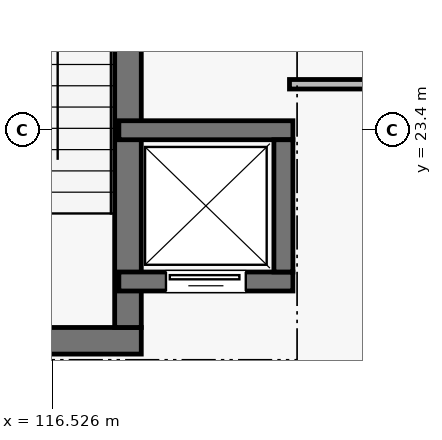
"""IFC4 building model, lengths in metres.
Left out: names, types, materials, properties, quantities, classifications, styles, units other than length and angle.
Written with IfcOpenShell. Run it as: python <this file> out.ifc"""

import sys

from ifc_helpers import new_model, si_unit, direction, frame, frame_2d, origin, place, context, subcontext, project, spatial, rectangle, extrude, element, fill, save


model = new_model("IFC4")
c1 = context("Model", 3, precision=1e-05, world=origin(), true_north=direction((0.0, 1.0)))
c2 = subcontext(c1, "Body", "Model", "MODEL_VIEW")
j1 = project(units=[si_unit("LENGTHUNIT", "METRE"), si_unit("PLANEANGLEUNIT", "RADIAN")], contexts=[c1])
p1 = place(None, origin())
s1 = spatial("IfcSite", under=j1, at=p1, CompositionType="ELEMENT")
p2 = place(p1, origin())
s2 = spatial("IfcBuilding", under=s1, at=p2, CompositionType="ELEMENT")
p3 = place(p2, origin())
s3 = spatial("IfcBuildingStorey", under=s2, at=p3, CompositionType="ELEMENT", Elevation=0.0)
p4 = place(p3, frame((113.85, 20.625, 0.0), z_axis=(0.0, 0.0, 1.0), x_axis=(1.0, 0.0, 0.0)))
e1 = element("IfcWall", 1, at=p4, inside=s3, PredefinedType="SHEAR", context=c2, shape_type="SweptSolid", body=[
    extrude(rectangle(XDim=3.85, YDim=0.35, at=frame_2d((1.925, 0.0))), origin(), (0.0, 0.0, 1.0), 5.18),
])
p5 = place(p4, frame((0.45, 0.0, 0.0)))
e2 = element("IfcOpeningElement", 2, at=p5, cuts=e1, PredefinedType="OPENING", context=c2, shape_type="SweptSolid", body=[
    extrude(rectangle(XDim=1.5, YDim=2.2, at=frame_2d((0.75, 1.1))), frame((0.0, 0.185, 0.0), z_axis=(0.0, -1.0, 0.0), x_axis=(1.0, 0.0, 0.0)), (0.0, 0.0, 1.0), 0.37),
])
p6 = place(p3, frame((117.525, 20.8, 0.0), z_axis=(0.0, 0.0, 1.0), x_axis=(0.0, 1.0, 0.0)))
e3 = element("IfcWall", 3, at=p6, inside=s3, PredefinedType="SHEAR", context=c2, shape_type="SweptSolid", body=[
    extrude(rectangle(XDim=7.05, YDim=0.35, at=frame_2d((3.525, 0.0))), origin(), (0.0, 0.0, 1.0), 5.18),
])
p7 = place(p3, frame((117.405, 21.405, 0.0), z_axis=(0.0, 0.0, 1.0), x_axis=(1.0, 0.0, 0.0)))
e4 = element("IfcWall", 4, at=p7, inside=s3, PredefinedType="SHEAR", context=c2, shape_type="SweptSolid", body=[
    extrude(rectangle(XDim=2.29, YDim=0.25, at=frame_2d((1.145, 0.0))), origin(), (0.0, 0.0, 1.0), 5.16),
])
p8 = place(p7, frame((0.62, 0.0, 0.0)))
e5 = element("IfcOpeningElement", 5, at=p8, cuts=e4, PredefinedType="OPENING", context=c2, shape_type="SweptSolid", body=[
    extrude(rectangle(XDim=1.05, YDim=2.15, at=frame_2d((0.525, 1.075))), frame((0.0, 0.135, 0.0), z_axis=(0.0, -1.0, 0.0), x_axis=(1.0, 0.0, 0.0)), (0.0, 0.0, 1.0), 0.27),
])
p9 = place(p3, frame((117.405, 23.395, 0.0), z_axis=(0.0, 0.0, 1.0), x_axis=(1.0, 0.0, 0.0)))
e6 = element("IfcWall", 6, at=p9, inside=s3, PredefinedType="SHEAR", context=c2, shape_type="SweptSolid", body=[
    extrude(rectangle(XDim=2.29, YDim=0.25, at=frame_2d((1.145, 0.0))), origin(), (0.0, 0.0, 1.0), 5.16),
])
p10 = place(p3, frame((119.57, 21.53, 0.0), z_axis=(0.0, 0.0, 1.0), x_axis=(0.0, 1.0, 0.0)))
e7 = element("IfcWall", 7, at=p10, inside=s3, PredefinedType="SHEAR", context=c2, shape_type="SweptSolid", body=[
    extrude(rectangle(XDim=1.74, YDim=0.25, at=frame_2d((0.87, 0.0))), origin(), (0.0, 0.0, 1.0), 5.16),
])
p11 = place(p3, frame((119.65, 24.0, 0.0), z_axis=(0.0, 0.0, 1.0), x_axis=(1.0, 0.0, 0.0)))
e8 = element("IfcWall", 8, at=p11, inside=s3, PredefinedType="PARTITIONING", context=c2, shape_type="SweptSolid", body=[
    extrude(rectangle(XDim=14.32, YDim=0.125, at=frame_2d((7.16, 0.0))), origin(), (0.0, 0.0, 1.0), 5.08),
])
p12 = place(p11, frame((6.57, 0.0, 0.0)))
e9 = element("IfcOpeningElement", 9, at=p12, cuts=e8, PredefinedType="OPENING", context=c2, shape_type="SweptSolid", body=[
    extrude(rectangle(XDim=1.18, YDim=2.2, at=frame_2d((0.59, 1.1))), frame((0.0, 0.073, 0.0), z_axis=(0.0, -1.0, 0.0), x_axis=(1.0, 0.0, 0.0)), (0.0, 0.0, 1.0), 0.145),
])
p13 = place(p8, frame((1.05, 0.0, 0.0), z_axis=(0.0, 0.0, 1.0), x_axis=(-1.0, 0.0, 0.0)))
e10 = element("IfcDoor", 10, at=p13, inside=s3, OperationType="SLIDING_TO_RIGHT", PredefinedType="DOOR", context=c2, shape_type="SweptSolid", body=[
    extrude(rectangle(XDim=1.05, YDim=2.15, at=frame_2d((0.525, 1.075))), frame((0.0, 0.025, 0.0), z_axis=(0.0, -1.0, 0.0), x_axis=(1.0, 0.0, 0.0)), (0.0, 0.0, 1.0), 0.05),
])
fill(e5, e10)
save(model, sys.argv[1])
